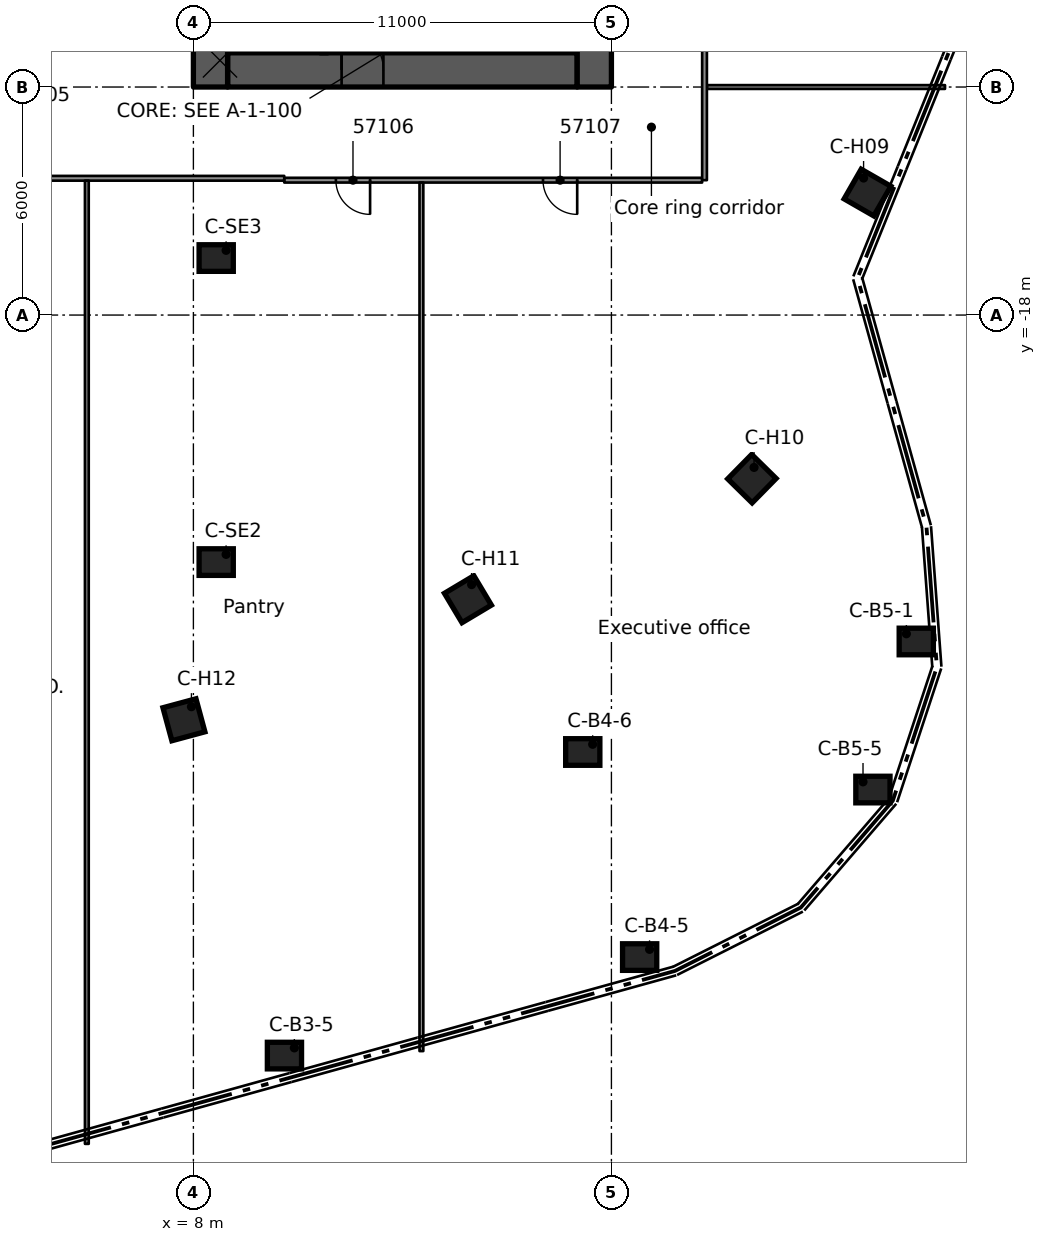
"""IFC4 building model, lengths in metres.
Left out: names, types, materials, properties, quantities, classifications, styles, units other than length and angle.
Written with IfcOpenShell. Run it as: python <this file> out.ifc"""

import sys

from ifc_helpers import new_model, si_unit, direction, frame, frame_2d, origin, origin_2d, place, context, subcontext, project, spatial, rectangle, extrude, element, fill, save


model = new_model("IFC4")
c1 = context("Model", 3, precision=1e-05, world=origin(), true_north=direction((0.0, 1.0)))
c2 = subcontext(c1, "Body", "Model", "MODEL_VIEW")
j1 = project(units=[si_unit("LENGTHUNIT", "METRE"), si_unit("PLANEANGLEUNIT", "RADIAN")], contexts=[c1])
p1 = place(None, origin())
s1 = spatial("IfcSite", under=j1, at=p1, CompositionType="ELEMENT")
p2 = place(p1, origin())
s2 = spatial("IfcBuilding", under=s1, at=p2, CompositionType="ELEMENT")
p3 = place(p2, frame((0.0, 0.0, 282.4)))
s3 = spatial("IfcBuildingStorey", under=s2, at=p3, CompositionType="ELEMENT", Elevation=282.4)
p4 = place(p3, frame((8.9, -11.55, 0.0), z_axis=(0.0, 0.0, 1.0), x_axis=(1.0, 0.0, 0.0)))
e1 = element("IfcWall", 1, at=p4, inside=s3, PredefinedType="SHEAR", context=c2, shape_type="SweptSolid", body=[
    extrude(rectangle(XDim=9.2, YDim=0.9, at=frame_2d((4.6, 0.0))), origin(), (0.0, 0.0, 1.0), 3.5),
])
p5 = place(p4, frame((3.0, 0.0, 0.0)))
e2 = element("IfcOpeningElement", 2, at=p5, cuts=e1, PredefinedType="OPENING", context=c2, shape_type="SweptSolid", body=[
    extrude(rectangle(XDim=1.1, YDim=2.1, at=frame_2d((0.55, 1.05))), frame((0.0, 0.46, 0.0), z_axis=(0.0, -1.0, 0.0), x_axis=(1.0, 0.0, 0.0)), (0.0, 0.0, 1.0), 0.92),
])
p6 = place(p3, frame((8.45, -12.0, 0.0), z_axis=(0.0, 0.0, 1.0), x_axis=(0.0, 1.0, 0.0)))
e3 = element("IfcWall", 3, at=p6, inside=s3, PredefinedType="SHEAR", context=c2, shape_type="SweptSolid", body=[
    extrude(rectangle(XDim=24.0, YDim=0.9, at=frame_2d((12.0, 0.0))), origin(), (0.0, 0.0, 1.0), 3.5),
])
p7 = place(p6, frame((12.6, 0.0, 0.0)))
e4 = element("IfcOpeningElement", 4, at=p7, cuts=e3, PredefinedType="OPENING", context=c2, shape_type="SweptSolid", body=[
    extrude(rectangle(XDim=1.8, YDim=2.1, at=frame_2d((0.9, 1.05))), frame((0.0, 0.46, 0.0), z_axis=(0.0, -1.0, 0.0), x_axis=(1.0, 0.0, 0.0)), (0.0, 0.0, 1.0), 0.92),
])
p8 = place(p6, frame((3.25, 0.0, 0.0)))
e5 = element("IfcOpeningElement", 5, at=p8, cuts=e3, PredefinedType="OPENING", context=c2, shape_type="SweptSolid", body=[
    extrude(rectangle(XDim=1.1, YDim=2.1, at=frame_2d((0.55, 1.05))), frame((0.0, 0.46, 0.0), z_axis=(0.0, -1.0, 0.0), x_axis=(1.0, 0.0, 0.0)), (0.0, 0.0, 1.0), 0.92),
])
p9 = place(p3, frame((18.55, -12.0, 0.0), z_axis=(0.0, 0.0, 1.0), x_axis=(0.0, 1.0, 0.0)))
e6 = element("IfcWall", 6, at=p9, inside=s3, PredefinedType="SHEAR", context=c2, shape_type="SweptSolid", body=[
    extrude(rectangle(XDim=24.0, YDim=0.9, at=frame_2d((12.0, 0.0))), origin(), (0.0, 0.0, 1.0), 3.5),
])
p10 = place(p9, frame((12.1, 0.0, 0.0)))
e7 = element("IfcOpeningElement", 7, at=p10, cuts=e6, PredefinedType="OPENING", context=c2, shape_type="SweptSolid", body=[
    extrude(rectangle(XDim=1.8, YDim=2.1, at=frame_2d((0.9, 1.05))), frame((0.0, 0.46, 0.0), z_axis=(0.0, -1.0, 0.0), x_axis=(1.0, 0.0, 0.0)), (0.0, 0.0, 1.0), 0.92),
])
for number, where, z_axis, x_axis in (
    (8, (10.396, -37.485, 0.0), (0.0, 0.0, 1.0), (1.0, 0.0, 0.0)),
    (9, (19.743, -34.893, 0.0), (0.0, 0.0, 1.0), (1.0, 0.0, 0.0)),
    (10, (18.246, -29.497, 0.0), (0.0, 0.0, 1.0), (1.0, 0.0, 0.0)),
    (11, (27.022, -26.589, 0.0), (0.0, 0.0, 1.0), (1.0, 0.0, 0.0)),
    (12, (25.881, -30.485, 0.0), (0.0, 0.0, 1.0), (1.0, 0.0, 0.0)),
):
    element("IfcColumn", number, at=place(p3, frame(where, z_axis=z_axis, x_axis=x_axis)), inside=s3, PredefinedType="COLUMN", context=c2, shape_type="SweptSolid", body=[
        extrude(rectangle(XDim=0.9, YDim=0.7, at=origin_2d()), origin(), (0.0, 0.0, 1.0), 3.5),
    ])
for number, where, z_axis, x_axis in (
    (13, (25.739, -14.777, 0.0), (0.0, 0.0, 1.0), (0.867, -0.498, 0.0)),
    (14, (22.697, -22.305, 0.0), (0.0, 0.0, 1.0), (0.713, -0.701, 0.0)),
    (15, (15.224, -25.477, 0.0), (0.0, 0.0, 1.0), (0.513, -0.858, 0.0)),
    (16, (7.751, -28.649, 0.0), (0.0, 0.0, 1.0), (0.261, -0.965, 0.0)),
):
    element("IfcColumn", number, at=place(p3, frame(where, z_axis=z_axis, x_axis=x_axis)), inside=s3, PredefinedType="COLUMN", context=c2, shape_type="SweptSolid", body=[
        extrude(rectangle(XDim=0.9, YDim=0.9, at=origin_2d()), origin(), (0.0, 0.0, 1.0), 3.5),
    ])
for number, where, z_axis, x_axis in (
    (17, (8.6, -24.5, 0.0), (0.0, 0.0, 1.0), (1.0, 0.0, 0.0)),
    (18, (8.6, -16.5, 0.0), (0.0, 0.0, 1.0), (1.0, 0.0, 0.0)),
):
    element("IfcColumn", number, at=place(p3, frame(where, z_axis=z_axis, x_axis=x_axis)), inside=s3, PredefinedType="COLUMN", context=c2, shape_type="SweptSolid", body=[
        extrude(rectangle(XDim=0.9, YDim=0.7, at=origin_2d()), origin(), (0.0, 0.0, 1.0), 3.5),
    ])
p11 = place(p3, frame((11.44, -6.975, 0.0), z_axis=(0.0, 0.0, 1.0), x_axis=(0.0, -1.0, 0.0)))
e19 = element("IfcWall", 19, at=p11, inside=s3, PredefinedType="SOLIDWALL", context=c2, shape_type="SweptSolid", body=[
    extrude(rectangle(XDim=4.125, YDim=0.2, at=frame_2d((2.062, 0.0))), origin(), (0.0, 0.0, 1.0), 3.09),
])
p12 = place(p11, frame((2.1, 0.0, 0.0)))
e20 = element("IfcOpeningElement", 20, at=p12, cuts=e19, PredefinedType="OPENING", context=c2, shape_type="SweptSolid", body=[
    extrude(rectangle(XDim=1.1, YDim=2.1, at=frame_2d((0.55, 1.05))), frame((0.0, 0.11, 0.0), z_axis=(0.0, -1.0, 0.0), x_axis=(1.0, 0.0, 0.0)), (0.0, 0.0, 1.0), 0.22),
])
p13 = place(p3, frame((21.387, -14.451, 0.0), z_axis=(0.0, 0.0, 1.0), x_axis=(-1.0, 0.0, 0.0)))
e21 = element("IfcWall", 21, at=p13, inside=s3, PredefinedType="PARTITIONING", context=c2, shape_type="SweptSolid", body=[
    extrude(rectangle(XDim=10.996, YDim=0.125, at=frame_2d((5.498, 0.0))), origin(), (0.0, 0.0, 1.0), 3.08),
])
p14 = place(p13, frame((8.738, 0.0, 0.0)))
e22 = element("IfcOpeningElement", 22, at=p14, cuts=e21, PredefinedType="OPENING", context=c2, shape_type="SweptSolid", body=[
    extrude(rectangle(XDim=0.9, YDim=2.1, at=frame_2d((0.45, 1.05))), frame((0.0, 0.073, 0.0), z_axis=(0.0, -1.0, 0.0), x_axis=(1.0, 0.0, 0.0)), (0.0, 0.0, 1.0), 0.145),
])
p15 = place(p13, frame((3.288, 0.0, 0.0)))
e23 = element("IfcOpeningElement", 23, at=p15, cuts=e21, PredefinedType="OPENING", context=c2, shape_type="SweptSolid", body=[
    extrude(rectangle(XDim=0.9, YDim=2.1, at=frame_2d((0.45, 1.05))), frame((0.0, 0.073, 0.0), z_axis=(0.0, -1.0, 0.0), x_axis=(1.0, 0.0, 0.0)), (0.0, 0.0, 1.0), 0.145),
])
p16 = place(p3, frame((10.391, -14.401, 0.0), z_axis=(0.0, 0.0, 1.0), x_axis=(-1.0, 0.0, 0.0)))
e24 = element("IfcWall", 24, at=p16, inside=s3, PredefinedType="PARTITIONING", context=c2, shape_type="SweptSolid", body=[
    extrude(rectangle(XDim=20.74, YDim=0.125, at=frame_2d((10.37, 0.0))), origin(), (0.0, 0.0, 1.0), 3.08),
])
p17 = place(p16, frame((11.991, 0.0, 0.0)))
e25 = element("IfcOpeningElement", 25, at=p17, cuts=e24, PredefinedType="OPENING", context=c2, shape_type="SweptSolid", body=[
    extrude(rectangle(XDim=1.8, YDim=2.1, at=frame_2d((0.9, 1.05))), frame((0.0, 0.073, 0.0), z_axis=(0.0, -1.0, 0.0), x_axis=(1.0, 0.0, 0.0)), (0.0, 0.0, 1.0), 0.145),
])
p18 = place(p16, frame((6.795, 0.0, 0.0)))
e26 = element("IfcOpeningElement", 26, at=p18, cuts=e24, PredefinedType="OPENING", context=c2, shape_type="SweptSolid", body=[
    extrude(rectangle(XDim=1.8, YDim=2.1, at=frame_2d((0.9, 1.05))), frame((0.0, 0.073, 0.0), z_axis=(0.0, -1.0, 0.0), x_axis=(1.0, 0.0, 0.0)), (0.0, 0.0, 1.0), 0.145),
])
p19 = place(p3, frame((21.512, -12.0, 0.0), z_axis=(0.0, 0.0, 1.0), x_axis=(1.0, 0.0, 0.0)))
e27 = element("IfcWall", 27, at=p19, inside=s3, PredefinedType="PARTITIONING", context=c2, shape_type="SweptSolid", body=[
    extrude(rectangle(XDim=6.266, YDim=0.1, at=frame_2d((3.133, 0.0))), origin(), (0.0, 0.0, 1.0), 3.08),
])
p20 = place(p3, frame((21.45, 14.451, 0.0), z_axis=(0.0, 0.0, 1.0), x_axis=(0.0, -1.0, 0.0)))
e28 = element("IfcWall", 28, at=p20, inside=s3, PredefinedType="PARTITIONING", context=c2, shape_type="SweptSolid", body=[
    extrude(rectangle(XDim=28.902, YDim=0.125, at=frame_2d((14.451, 0.0))), origin(), (0.0, 0.0, 1.0), 3.08),
])
p21 = place(p20, frame((20.051, 0.0, 0.0)))
e29 = element("IfcOpeningElement", 29, at=p21, cuts=e28, PredefinedType="OPENING", context=c2, shape_type="SweptSolid", body=[
    extrude(rectangle(XDim=0.9, YDim=2.1, at=frame_2d((0.45, 1.05))), frame((0.0, 0.073, 0.0), z_axis=(0.0, -1.0, 0.0), x_axis=(1.0, 0.0, 0.0)), (0.0, 0.0, 1.0), 0.145),
])
p22 = place(p20, frame((11.051, 0.0, 0.0)))
e30 = element("IfcOpeningElement", 30, at=p22, cuts=e28, PredefinedType="OPENING", context=c2, shape_type="SweptSolid", body=[
    extrude(rectangle(XDim=0.9, YDim=2.1, at=frame_2d((0.45, 1.05))), frame((0.0, 0.073, 0.0), z_axis=(0.0, -1.0, 0.0), x_axis=(1.0, 0.0, 0.0)), (0.0, 0.0, 1.0), 0.145),
])
p23 = place(p20, frame((4.551, 0.0, 0.0)))
e31 = element("IfcOpeningElement", 31, at=p23, cuts=e28, PredefinedType="OPENING", context=c2, shape_type="SweptSolid", body=[
    extrude(rectangle(XDim=1.8, YDim=2.1, at=frame_2d((0.9, 1.05))), frame((0.0, 0.073, 0.0), z_axis=(0.0, -1.0, 0.0), x_axis=(1.0, 0.0, 0.0)), (0.0, 0.0, 1.0), 0.145),
])
p24 = place(p3, frame((14.0, -37.367, 0.0), z_axis=(0.0, 0.0, 1.0), x_axis=(0.0, 1.0, 0.0)))
e32 = element("IfcWall", 32, at=p24, inside=s3, PredefinedType="PARTITIONING", context=c2, shape_type="SweptSolid", body=[
    extrude(rectangle(XDim=22.853, YDim=0.1, at=frame_2d((11.427, 0.0))), origin(), (0.0, 0.0, 1.0), 3.08),
])
p25 = place(p3, frame((5.196, -39.808, 0.0), z_axis=(0.0, 0.0, 1.0), x_axis=(0.0, 1.0, 0.0)))
e33 = element("IfcWall", 33, at=p25, inside=s3, PredefinedType="PARTITIONING", context=c2, shape_type="SweptSolid", body=[
    extrude(rectangle(XDim=25.345, YDim=0.1, at=frame_2d((12.673, 0.0))), origin(), (0.0, 0.0, 1.0), 3.08),
])
p26 = place(p5, origin())
e34 = element("IfcDoor", 34, at=p26, inside=s3, OperationType="SINGLE_SWING_LEFT", PredefinedType="DOOR", context=c2, shape_type="SweptSolid", body=[
    extrude(rectangle(XDim=1.1, YDim=2.1, at=frame_2d((0.55, 1.05))), frame((0.0, 0.025, 0.0), z_axis=(0.0, -1.0, 0.0), x_axis=(1.0, 0.0, 0.0)), (0.0, 0.0, 1.0), 0.05),
])
fill(e2, e34)
p27 = place(p14, origin())
e35 = element("IfcDoor", 35, at=p27, inside=s3, OperationType="SINGLE_SWING_RIGHT", PredefinedType="DOOR", context=c2, shape_type="SweptSolid", body=[
    extrude(rectangle(XDim=0.9, YDim=2.1, at=frame_2d((0.45, 1.05))), frame((0.0, 0.025, 0.0), z_axis=(0.0, -1.0, 0.0), x_axis=(1.0, 0.0, 0.0)), (0.0, 0.0, 1.0), 0.05),
])
fill(e22, e35)
p28 = place(p15, origin())
e36 = element("IfcDoor", 36, at=p28, inside=s3, OperationType="SINGLE_SWING_LEFT", PredefinedType="DOOR", context=c2, shape_type="SweptSolid", body=[
    extrude(rectangle(XDim=0.9, YDim=2.1, at=frame_2d((0.45, 1.05))), frame((0.0, 0.025, 0.0), z_axis=(0.0, -1.0, 0.0), x_axis=(1.0, 0.0, 0.0)), (0.0, 0.0, 1.0), 0.05),
])
fill(e23, e36)
save(model, sys.argv[1])
